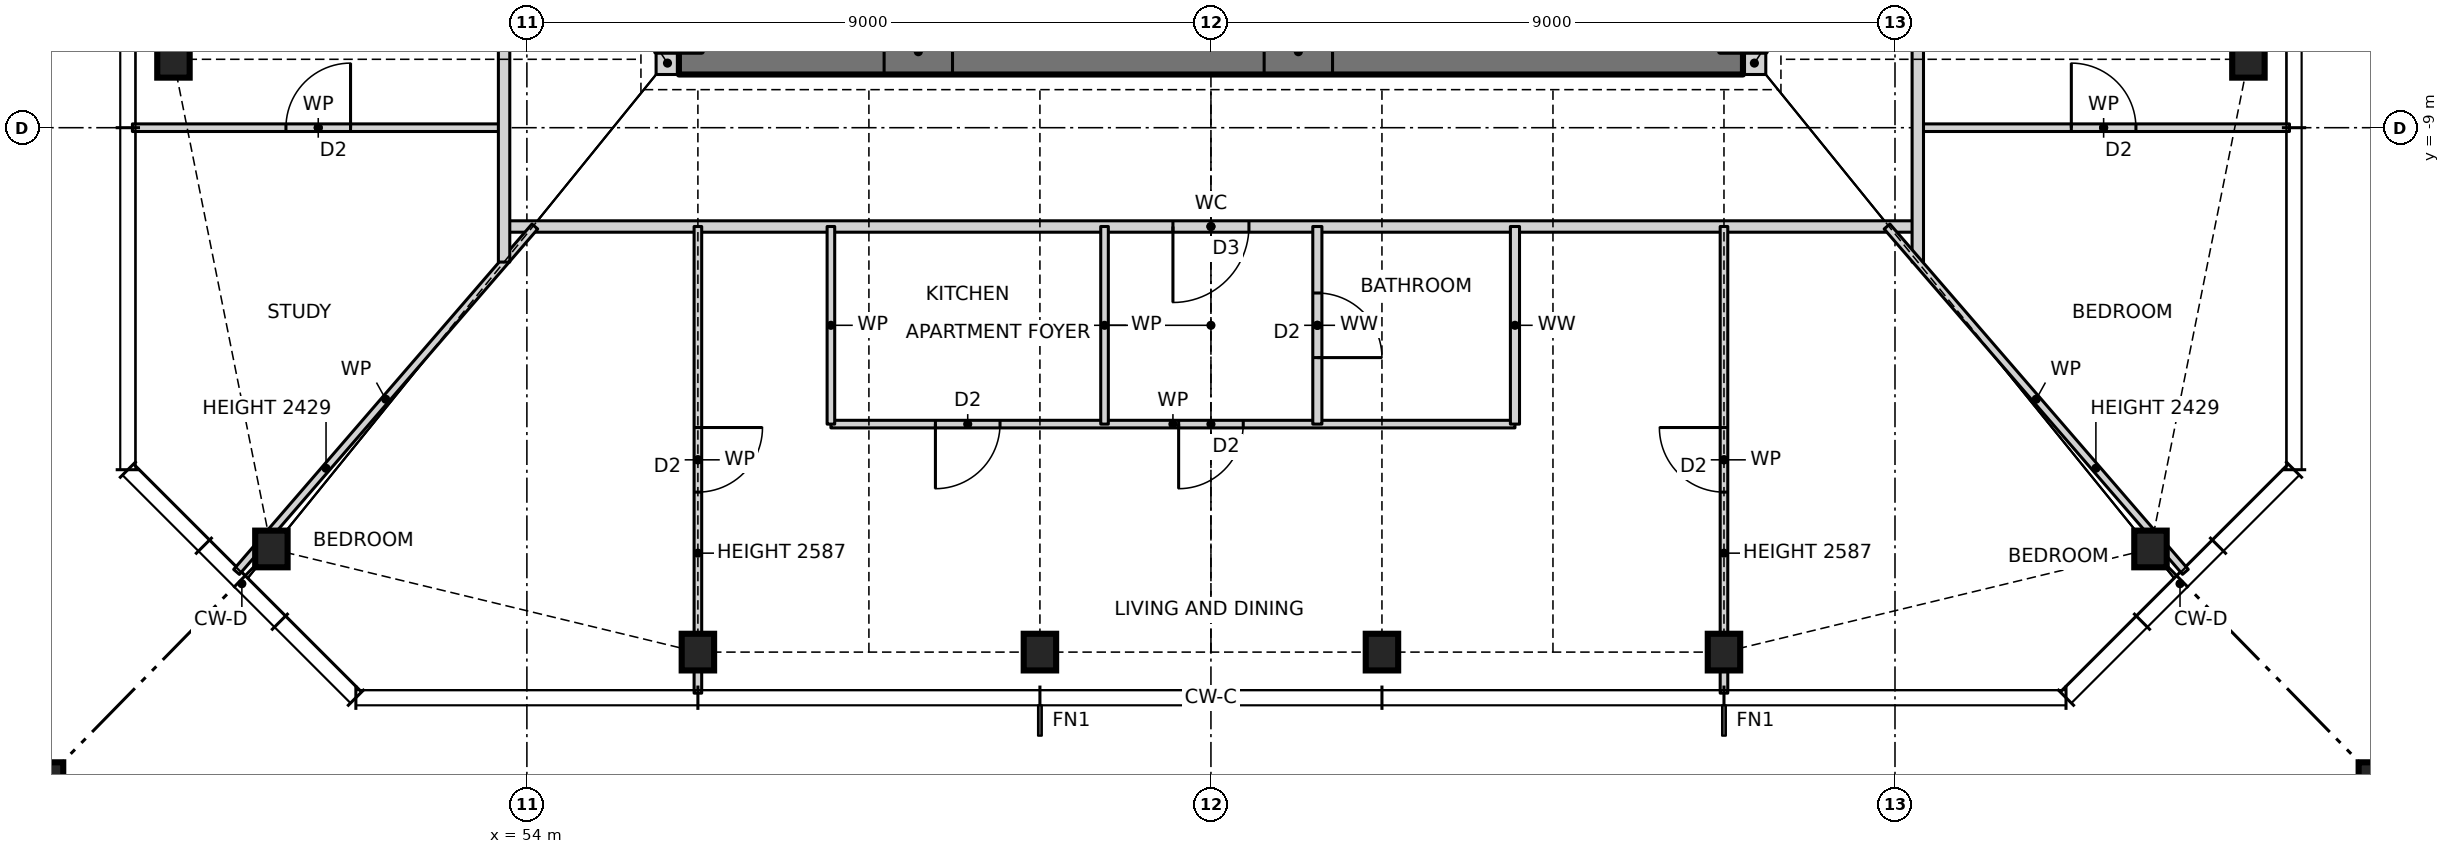
"""IFC4 building model, lengths in metres.
Left out: names, types, materials, properties, quantities, classifications, styles, units other than length and angle.
Written with IfcOpenShell. Run it as: python <this file> out.ifc"""

import sys

from ifc_helpers import new_model, si_unit, direction, frame, frame_2d, origin, origin_2d, place, context, subcontext, project, spatial, rectangle, hollow_rectangle, i_section, extrude, element, fill, save


model = new_model("IFC4")
c1 = context("Model", 3, precision=1e-05, world=origin(), true_north=direction((0.0, 1.0)))
c2 = subcontext(c1, "Body", "Model", "MODEL_VIEW")
j1 = project(units=[si_unit("LENGTHUNIT", "METRE"), si_unit("PLANEANGLEUNIT", "RADIAN")], contexts=[c1])
p1 = place(None, origin())
s1 = spatial("IfcSite", under=j1, at=p1, CompositionType="ELEMENT")
p2 = place(p1, origin())
s2 = spatial("IfcBuilding", under=s1, at=p2, CompositionType="ELEMENT")
p3 = place(p2, frame((0.0, 0.0, 115.5)))
s3 = spatial("IfcBuildingStorey", under=s2, at=p3, CompositionType="ELEMENT", Elevation=115.5)
for number, where, z_axis, x_axis in (
    (1, (50.639, -14.543, 0.0), (0.0, 0.0, 1.0), (1.0, 0.0, 0.0)),
    (2, (56.25, -15.9, 0.0), (0.0, 0.0, 1.0), (1.0, 0.0, 0.0)),
    (3, (60.75, -15.9, 0.0), (0.0, 0.0, 1.0), (1.0, 0.0, 0.0)),
    (4, (65.25, -15.9, 0.0), (0.0, 0.0, 1.0), (1.0, 0.0, 0.0)),
    (5, (69.75, -15.9, 0.0), (0.0, 0.0, 1.0), (1.0, 0.0, 0.0)),
    (6, (75.361, -14.543, 0.0), (0.0, 0.0, 1.0), (1.0, 0.0, 0.0)),
    (7, (76.65, -8.1, 0.0), (0.0, 0.0, 1.0), (1.0, 0.0, 0.0)),
    (8, (49.35, -8.1, 0.0), (0.0, 0.0, 1.0), (1.0, 0.0, 0.0)),
):
    element("IfcColumn", number, at=place(p3, frame(where, z_axis=z_axis, x_axis=x_axis)), inside=s3, PredefinedType="COLUMN", context=c2, shape_type="SweptSolid", body=[
        extrude(i_section(OverallWidth=0.427, OverallDepth=0.483, WebThickness=0.051, FlangeThickness=0.082, at=origin_2d()), origin(), (0.0, 0.0, 1.0), 3.5),
    ])
for number, where, z_axis, x_axis in (
    (9, (47.35, -17.9, 0.0), (0.0, 0.0, 1.0), (1.0, 0.0, 0.0)),
    (10, (78.65, -17.9, 0.0), (0.0, 0.0, 1.0), (1.0, 0.0, 0.0)),
):
    element("IfcColumn", number, at=place(p3, frame(where, z_axis=z_axis, x_axis=x_axis)), inside=s3, PredefinedType="COLUMN", context=c2, shape_type="SweptSolid", body=[
        extrude(hollow_rectangle(XDim=1.1, YDim=1.1, WallThickness=0.06, at=origin_2d()), origin(), (0.0, 0.0, 1.0), 3.5),
    ])
for number, where, z_axis, x_axis in (
    (11, (55.7, -8.15, 0.0), (0.0, 0.0, 1.0), (1.0, 0.0, 0.0)),
    (12, (70.0, -8.15, 0.0), (0.0, 0.0, 1.0), (1.0, 0.0, 0.0)),
):
    element("IfcWall", number, at=place(p3, frame(where, z_axis=z_axis, x_axis=x_axis)), inside=s3, PredefinedType="SOLIDWALL", context=c2, shape_type="SweptSolid", body=[
        extrude(rectangle(XDim=0.3, YDim=0.3, at=frame_2d((0.15, 0.0))), origin(), (0.0, 0.0, 1.0), 3.5),
    ])
p4 = place(p3, frame((56.0, -8.0, 0.0), z_axis=(0.0, 0.0, 1.0), x_axis=(1.0, 0.0, 0.0)))
e13 = element("IfcWall", 13, at=p4, inside=s3, PredefinedType="SHEAR", context=c2, shape_type="SweptSolid", body=[
    extrude(rectangle(XDim=14.0, YDim=0.6, at=frame_2d((7.0, 0.0))), origin(), (0.0, 0.0, 1.0), 3.5),
])
p5 = place(p4, frame((2.7, 0.0, 0.0)))
e14 = element("IfcOpeningElement", 14, at=p5, cuts=e13, PredefinedType="OPENING", context=c2, shape_type="SweptSolid", body=[
    extrude(rectangle(XDim=0.9, YDim=2.1, at=frame_2d((0.45, 1.05))), frame((0.0, 0.31, 0.0), z_axis=(0.0, -1.0, 0.0), x_axis=(1.0, 0.0, 0.0)), (0.0, 0.0, 1.0), 0.62),
])
p6 = place(p4, frame((7.7, 0.0, 0.0)))
e15 = element("IfcOpeningElement", 15, at=p6, cuts=e13, PredefinedType="OPENING", context=c2, shape_type="SweptSolid", body=[
    extrude(rectangle(XDim=0.9, YDim=2.1, at=frame_2d((0.45, 1.05))), frame((0.0, 0.31, 0.0), z_axis=(0.0, -1.0, 0.0), x_axis=(1.0, 0.0, 0.0)), (0.0, 0.0, 1.0), 0.62),
])
p7 = place(p3, frame((58.0, -12.9, 0.0), z_axis=(0.0, 0.0, 1.0), x_axis=(1.0, 0.0, 0.0)))
e16 = element("IfcWall", 16, at=p7, inside=s3, PredefinedType="PARTITIONING", context=c2, shape_type="SweptSolid", body=[
    extrude(rectangle(XDim=9.0, YDim=0.1, at=frame_2d((4.5, 0.0))), origin(), (0.0, 0.0, 1.0), 3.27),
])
p8 = place(p7, frame((1.375, 0.0, 0.0)))
e17 = element("IfcOpeningElement", 17, at=p8, cuts=e16, PredefinedType="OPENING", context=c2, shape_type="SweptSolid", body=[
    extrude(rectangle(XDim=0.85, YDim=2.1, at=frame_2d((0.425, 1.05))), frame((0.0, 0.06, 0.0), z_axis=(0.0, -1.0, 0.0), x_axis=(1.0, 0.0, 0.0)), (0.0, 0.0, 1.0), 0.12),
])
p9 = place(p7, frame((4.575, 0.0, 0.0)))
e18 = element("IfcOpeningElement", 18, at=p9, cuts=e16, PredefinedType="OPENING", context=c2, shape_type="SweptSolid", body=[
    extrude(rectangle(XDim=0.85, YDim=2.1, at=frame_2d((0.425, 1.05))), frame((0.0, 0.06, 0.0), z_axis=(0.0, -1.0, 0.0), x_axis=(1.0, 0.0, 0.0)), (0.0, 0.0, 1.0), 0.12),
])
p10 = place(p3, frame((53.7, -10.3, 0.0), z_axis=(0.0, 0.0, 1.0), x_axis=(1.0, 0.0, 0.0)))
e19 = element("IfcWall", 19, at=p10, inside=s3, PredefinedType="PARTITIONING", context=c2, shape_type="SweptSolid", body=[
    extrude(rectangle(XDim=18.6, YDim=0.15, at=frame_2d((9.3, 0.0))), origin(), (0.0, 0.0, 1.0), 3.27),
])
p11 = place(p10, frame((8.8, 0.0, 0.0)))
e20 = element("IfcOpeningElement", 20, at=p11, cuts=e19, PredefinedType="OPENING", context=c2, shape_type="SweptSolid", body=[
    extrude(rectangle(XDim=1.0, YDim=2.1, at=frame_2d((0.5, 1.05))), frame((0.0, 0.085, 0.0), z_axis=(0.0, -1.0, 0.0), x_axis=(1.0, 0.0, 0.0)), (0.0, 0.0, 1.0), 0.17),
])
p12 = place(p3, frame((48.81, -9.0, 0.0), z_axis=(0.0, 0.0, 1.0), x_axis=(1.0, 0.0, 0.0)))
e21 = element("IfcWall", 21, at=p12, inside=s3, PredefinedType="PARTITIONING", context=c2, shape_type="SweptSolid", body=[
    extrude(rectangle(XDim=4.89, YDim=0.1, at=frame_2d((2.445, 0.0))), origin(), (0.0, 0.0, 1.0), 3.27),
])
p13 = place(p12, frame((2.02, 0.0, 0.0)))
e22 = element("IfcOpeningElement", 22, at=p13, cuts=e21, PredefinedType="OPENING", context=c2, shape_type="SweptSolid", body=[
    extrude(rectangle(XDim=0.85, YDim=2.1, at=frame_2d((0.425, 1.05))), frame((0.0, 0.06, 0.0), z_axis=(0.0, -1.0, 0.0), x_axis=(1.0, 0.0, 0.0)), (0.0, 0.0, 1.0), 0.12),
])
p14 = place(p3, frame((72.3, -9.0, 0.0), z_axis=(0.0, 0.0, 1.0), x_axis=(1.0, 0.0, 0.0)))
e23 = element("IfcWall", 23, at=p14, inside=s3, PredefinedType="PARTITIONING", context=c2, shape_type="SweptSolid", body=[
    extrude(rectangle(XDim=4.89, YDim=0.1, at=frame_2d((2.445, 0.0))), origin(), (0.0, 0.0, 1.0), 3.27),
])
p15 = place(p14, frame((2.02, 0.0, 0.0)))
e24 = element("IfcOpeningElement", 24, at=p15, cuts=e23, PredefinedType="OPENING", context=c2, shape_type="SweptSolid", body=[
    extrude(rectangle(XDim=0.85, YDim=2.1, at=frame_2d((0.425, 1.05))), frame((0.0, 0.06, 0.0), z_axis=(0.0, -1.0, 0.0), x_axis=(1.0, 0.0, 0.0)), (0.0, 0.0, 1.0), 0.12),
])
p16 = place(p3, frame((50.18, -14.845, 0.0), z_axis=(0.0, 0.0, 1.0), x_axis=(0.653585997703, 0.756852260092, 0.0)))
e25 = element("IfcWall", 25, at=p16, inside=s3, PredefinedType="PARTITIONING", context=c2, shape_type="SweptSolid", body=[
    extrude(rectangle(XDim=6.005, YDim=0.1, at=frame_2d((3.002, 0.0))), origin(), (0.0, 0.0, 1.0), 2.429),
])
p17 = place(p3, frame((72.3, -10.768, 0.0), z_axis=(0.0, 0.0, 1.0), x_axis=(0.0, 1.0, 0.0)))
e26 = element("IfcWall", 26, at=p17, inside=s3, PredefinedType="PARTITIONING", context=c2, shape_type="SweptSolid", body=[
    extrude(rectangle(XDim=21.536, YDim=0.15, at=frame_2d((10.768, 0.0))), origin(), (0.0, 0.0, 1.0), 3.27),
])
p18 = place(p17, frame((10.268, 0.0, 0.0)))
e27 = element("IfcOpeningElement", 27, at=p18, cuts=e26, PredefinedType="OPENING", context=c2, shape_type="SweptSolid", body=[
    extrude(rectangle(XDim=1.0, YDim=2.1, at=frame_2d((0.5, 1.05))), frame((0.0, 0.085, 0.0), z_axis=(0.0, -1.0, 0.0), x_axis=(1.0, 0.0, 0.0)), (0.0, 0.0, 1.0), 0.17),
])
p19 = place(p3, frame((69.75, -16.44, 0.0), z_axis=(0.0, 0.0, 1.0), x_axis=(0.0, 1.0, 0.0)))
e28 = element("IfcWall", 28, at=p19, inside=s3, PredefinedType="PARTITIONING", context=c2, shape_type="SweptSolid", body=[
    extrude(rectangle(XDim=6.14, YDim=0.1, at=frame_2d((3.07, 0.0))), origin(), (0.0, 0.0, 1.0), 2.587),
])
p20 = place(p19, frame((2.645, 0.0, 0.0)))
e29 = element("IfcOpeningElement", 29, at=p20, cuts=e28, PredefinedType="OPENING", context=c2, shape_type="SweptSolid", body=[
    extrude(rectangle(XDim=0.85, YDim=2.1, at=frame_2d((0.425, 1.05))), frame((0.0, 0.06, 0.0), z_axis=(0.0, -1.0, 0.0), x_axis=(1.0, 0.0, 0.0)), (0.0, 0.0, 1.0), 0.12),
])
p21 = place(p3, frame((67.0, -12.9, 0.0), z_axis=(0.0, 0.0, 1.0), x_axis=(0.0, 1.0, 0.0)))
e30 = element("IfcWall", 30, at=p21, inside=s3, PredefinedType="PARTITIONING", context=c2, shape_type="SweptSolid", body=[
    extrude(rectangle(XDim=2.6, YDim=0.12, at=frame_2d((1.3, 0.0))), origin(), (0.0, 0.0, 1.0), 3.27),
])
p22 = place(p3, frame((64.4, -12.9, 0.0), z_axis=(0.0, 0.0, 1.0), x_axis=(0.0, 1.0, 0.0)))
e31 = element("IfcWall", 31, at=p22, inside=s3, PredefinedType="PARTITIONING", context=c2, shape_type="SweptSolid", body=[
    extrude(rectangle(XDim=2.6, YDim=0.12, at=frame_2d((1.3, 0.0))), origin(), (0.0, 0.0, 1.0), 3.27),
])
p23 = place(p22, frame((0.875, 0.0, 0.0)))
e32 = element("IfcOpeningElement", 32, at=p23, cuts=e31, PredefinedType="OPENING", context=c2, shape_type="SweptSolid", body=[
    extrude(rectangle(XDim=0.85, YDim=2.1, at=frame_2d((0.425, 1.05))), frame((0.0, 0.07, 0.0), z_axis=(0.0, -1.0, 0.0), x_axis=(1.0, 0.0, 0.0)), (0.0, 0.0, 1.0), 0.14),
])
for number, where, z_axis, x_axis in (
    (33, (61.6, -12.9, 0.0), (0.0, 0.0, 1.0), (0.0, 1.0, 0.0)),
    (34, (58.0, -12.9, 0.0), (0.0, 0.0, 1.0), (0.0, 1.0, 0.0)),
):
    element("IfcWall", number, at=place(p3, frame(where, z_axis=z_axis, x_axis=x_axis)), inside=s3, PredefinedType="PARTITIONING", context=c2, shape_type="SweptSolid", body=[
        extrude(rectangle(XDim=2.6, YDim=0.1, at=frame_2d((1.3, 0.0))), origin(), (0.0, 0.0, 1.0), 3.27),
    ])
p24 = place(p3, frame((56.25, -16.44, 0.0), z_axis=(0.0, 0.0, 1.0), x_axis=(0.0, 1.0, 0.0)))
e35 = element("IfcWall", 35, at=p24, inside=s3, PredefinedType="PARTITIONING", context=c2, shape_type="SweptSolid", body=[
    extrude(rectangle(XDim=6.14, YDim=0.1, at=frame_2d((3.07, 0.0))), origin(), (0.0, 0.0, 1.0), 2.587),
])
p25 = place(p24, frame((2.645, 0.0, 0.0)))
e36 = element("IfcOpeningElement", 36, at=p25, cuts=e35, PredefinedType="OPENING", context=c2, shape_type="SweptSolid", body=[
    extrude(rectangle(XDim=0.85, YDim=2.1, at=frame_2d((0.425, 1.05))), frame((0.0, 0.06, 0.0), z_axis=(0.0, -1.0, 0.0), x_axis=(1.0, 0.0, 0.0)), (0.0, 0.0, 1.0), 0.12),
])
p26 = place(p3, frame((53.7, -10.768, 0.0), z_axis=(0.0, 0.0, 1.0), x_axis=(0.0, 1.0, 0.0)))
e37 = element("IfcWall", 37, at=p26, inside=s3, PredefinedType="PARTITIONING", context=c2, shape_type="SweptSolid", body=[
    extrude(rectangle(XDim=21.536, YDim=0.15, at=frame_2d((10.768, 0.0))), origin(), (0.0, 0.0, 1.0), 3.27),
])
p27 = place(p26, frame((10.268, 0.0, 0.0)))
e38 = element("IfcOpeningElement", 38, at=p27, cuts=e37, PredefinedType="OPENING", context=c2, shape_type="SweptSolid", body=[
    extrude(rectangle(XDim=1.0, YDim=2.1, at=frame_2d((0.5, 1.05))), frame((0.0, 0.085, 0.0), z_axis=(0.0, -1.0, 0.0), x_axis=(1.0, 0.0, 0.0)), (0.0, 0.0, 1.0), 0.17),
])
p28 = place(p3, frame((75.821, -14.844, 0.0), z_axis=(0.0, 0.0, 1.0), x_axis=(-0.65378286253, 0.756682211144, 0.0)))
e39 = element("IfcWall", 39, at=p28, inside=s3, PredefinedType="PARTITIONING", context=c2, shape_type="SweptSolid", body=[
    extrude(rectangle(XDim=6.005, YDim=0.1, at=frame_2d((3.002, 0.0))), origin(), (0.0, 0.0, 1.0), 2.429),
])
p29 = place(p8, frame((0.85, 0.0, 0.0), z_axis=(0.0, 0.0, 1.0), x_axis=(-1.0, 0.0, 0.0)))
e40 = element("IfcDoor", 40, at=p29, inside=s3, OperationType="SINGLE_SWING_RIGHT", PredefinedType="DOOR", context=c2, shape_type="SweptSolid", body=[
    extrude(rectangle(XDim=0.85, YDim=2.1, at=frame_2d((0.425, 1.05))), frame((0.0, 0.025, 0.0), z_axis=(0.0, -1.0, 0.0), x_axis=(1.0, 0.0, 0.0)), (0.0, 0.0, 1.0), 0.05),
])
fill(e17, e40)
p30 = place(p11, frame((1.0, 0.0, 0.0), z_axis=(0.0, 0.0, 1.0), x_axis=(-1.0, 0.0, 0.0)))
e41 = element("IfcDoor", 41, at=p30, inside=s3, OperationType="SINGLE_SWING_RIGHT", PredefinedType="DOOR", context=c2, shape_type="SweptSolid", body=[
    extrude(rectangle(XDim=1.0, YDim=2.1, at=frame_2d((0.5, 1.05))), frame((0.0, 0.025, 0.0), z_axis=(0.0, -1.0, 0.0), x_axis=(1.0, 0.0, 0.0)), (0.0, 0.0, 1.0), 0.05),
])
fill(e20, e41)
p31 = place(p9, frame((0.85, 0.0, 0.0), z_axis=(0.0, 0.0, 1.0), x_axis=(-1.0, 0.0, 0.0)))
e42 = element("IfcDoor", 42, at=p31, inside=s3, OperationType="SINGLE_SWING_RIGHT", PredefinedType="DOOR", context=c2, shape_type="SweptSolid", body=[
    extrude(rectangle(XDim=0.85, YDim=2.1, at=frame_2d((0.425, 1.05))), frame((0.0, 0.025, 0.0), z_axis=(0.0, -1.0, 0.0), x_axis=(1.0, 0.0, 0.0)), (0.0, 0.0, 1.0), 0.05),
])
fill(e18, e42)
p32 = place(p23, frame((0.85, 0.0, 0.0), z_axis=(0.0, 0.0, 1.0), x_axis=(-1.0, 0.0, 0.0)))
e43 = element("IfcDoor", 43, at=p32, inside=s3, OperationType="SINGLE_SWING_RIGHT", PredefinedType="DOOR", context=c2, shape_type="SweptSolid", body=[
    extrude(rectangle(XDim=0.85, YDim=2.1, at=frame_2d((0.425, 1.05))), frame((0.0, 0.025, 0.0), z_axis=(0.0, -1.0, 0.0), x_axis=(1.0, 0.0, 0.0)), (0.0, 0.0, 1.0), 0.05),
])
fill(e32, e43)
p33 = place(p25, frame((0.85, 0.0, 0.0), z_axis=(0.0, 0.0, 1.0), x_axis=(-1.0, 0.0, 0.0)))
e44 = element("IfcDoor", 44, at=p33, inside=s3, OperationType="SINGLE_SWING_LEFT", PredefinedType="DOOR", context=c2, shape_type="SweptSolid", body=[
    extrude(rectangle(XDim=0.85, YDim=2.1, at=frame_2d((0.425, 1.05))), frame((0.0, 0.025, 0.0), z_axis=(0.0, -1.0, 0.0), x_axis=(1.0, 0.0, 0.0)), (0.0, 0.0, 1.0), 0.05),
])
fill(e36, e44)
p34 = place(p20, origin())
e45 = element("IfcDoor", 45, at=p34, inside=s3, OperationType="SINGLE_SWING_RIGHT", PredefinedType="DOOR", context=c2, shape_type="SweptSolid", body=[
    extrude(rectangle(XDim=0.85, YDim=2.1, at=frame_2d((0.425, 1.05))), frame((0.0, 0.025, 0.0), z_axis=(0.0, -1.0, 0.0), x_axis=(1.0, 0.0, 0.0)), (0.0, 0.0, 1.0), 0.05),
])
fill(e29, e45)
p35 = place(p15, origin())
e46 = element("IfcDoor", 46, at=p35, inside=s3, OperationType="SINGLE_SWING_LEFT", PredefinedType="DOOR", context=c2, shape_type="SweptSolid", body=[
    extrude(rectangle(XDim=0.85, YDim=2.1, at=frame_2d((0.425, 1.05))), frame((0.0, 0.025, 0.0), z_axis=(0.0, -1.0, 0.0), x_axis=(1.0, 0.0, 0.0)), (0.0, 0.0, 1.0), 0.05),
])
fill(e24, e46)
p36 = place(p13, origin())
e47 = element("IfcDoor", 47, at=p36, inside=s3, OperationType="SINGLE_SWING_RIGHT", PredefinedType="DOOR", context=c2, shape_type="SweptSolid", body=[
    extrude(rectangle(XDim=0.85, YDim=2.1, at=frame_2d((0.425, 1.05))), frame((0.0, 0.025, 0.0), z_axis=(0.0, -1.0, 0.0), x_axis=(1.0, 0.0, 0.0)), (0.0, 0.0, 1.0), 0.05),
])
fill(e22, e47)
p37 = place(p5, origin())
e48 = element("IfcDoor", 48, at=p37, inside=s3, OperationType="SINGLE_SWING_LEFT", PredefinedType="DOOR", context=c2, shape_type="SweptSolid", body=[
    extrude(rectangle(XDim=0.9, YDim=2.1, at=frame_2d((0.45, 1.05))), frame((0.0, 0.025, 0.0), z_axis=(0.0, -1.0, 0.0), x_axis=(1.0, 0.0, 0.0)), (0.0, 0.0, 1.0), 0.05),
])
fill(e14, e48)
p38 = place(p6, origin())
e49 = element("IfcDoor", 49, at=p38, inside=s3, OperationType="SINGLE_SWING_LEFT", PredefinedType="DOOR", context=c2, shape_type="SweptSolid", body=[
    extrude(rectangle(XDim=0.9, YDim=2.1, at=frame_2d((0.45, 1.05))), frame((0.0, 0.025, 0.0), z_axis=(0.0, -1.0, 0.0), x_axis=(1.0, 0.0, 0.0)), (0.0, 0.0, 1.0), 0.05),
])
fill(e15, e49)
save(model, sys.argv[1])
